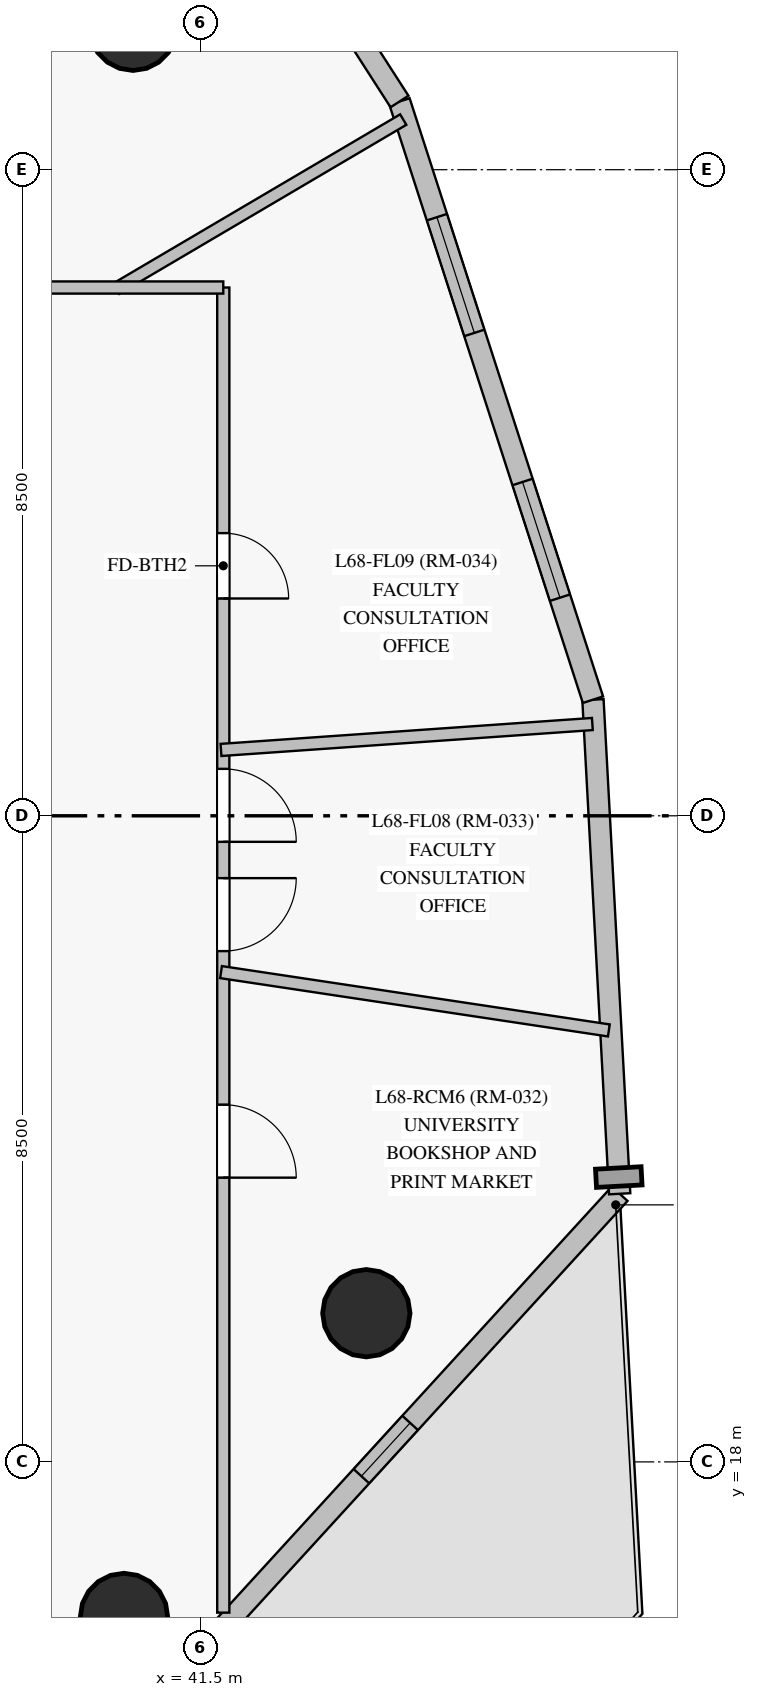
"""IFC4 building model, lengths in metres.
Left out: names, types, materials, properties, quantities, classifications, styles, units other than length and angle.
Written with IfcOpenShell. Run it as: python <this file> out.ifc"""

import sys

from ifc_helpers import new_model, si_unit, direction, frame, frame_2d, origin, origin_with_axes, origin_2d, place, context, subcontext, project, spatial, rectangle, circle, extrude, source, transform, mapped, element, fill, save


model = new_model("IFC4")
c1 = context("Model", 3, precision=1e-05, world=origin(), true_north=direction((0.0, 1.0)))
c2 = subcontext(c1, "Body", "Model", "MODEL_VIEW")
j1 = project(units=[si_unit("LENGTHUNIT", "METRE"), si_unit("PLANEANGLEUNIT", "RADIAN")], contexts=[c1])
p1 = place(None, origin())
s1 = spatial("IfcSite", under=j1, at=p1, CompositionType="ELEMENT")
p2 = place(p1, origin())
s2 = spatial("IfcBuilding", under=s1, at=p2, CompositionType="ELEMENT")
p3 = place(p2, frame((0.0, 0.0, 232.15)))
s3 = spatial("IfcBuildingStorey", under=s2, at=p3, CompositionType="ELEMENT", Elevation=232.15)
m1 = source(origin_with_axes(), c2, "Body", "SweptSolid", [
    extrude(circle(Radius=0.575, at=origin_2d()), origin(), (0.0, 0.0, 1.0), 3.05),
])
for number, where, z_axis, x_axis in (
    (1, (43.682, 19.956, 0.0), (0.0, 0.0, 1.0), (1.0, 0.0, 0.0)),
    (2, (40.613, 36.88, 0.0), (0.0, 0.0, 1.0), (1.0, 0.0, 0.0)),
    (3, (40.494, 15.96, 0.0), (0.0, 0.0, 1.0), (1.0, 0.0, 0.0)),
):
    element("IfcColumn", number, at=place(p3, frame(where, z_axis=z_axis, x_axis=x_axis)), inside=s3, PredefinedType="COLUMN", context=c2, shape_type="MappedRepresentation", body=[
        mapped(m1, transform((0.0, 0.0, 0.0), scale=1.0)),
    ])
p4 = place(p3, frame((34.218, 7.533, 0.0), z_axis=(0.0, 0.0, 1.0), x_axis=(0.674833312229, 0.737970189578, 0.0)))
e4 = element("IfcWall", 4, at=p4, inside=s3, PredefinedType="SOLIDWALL", context=c2, shape_type="SweptSolid", body=[
    extrude(rectangle(XDim=18.963, YDim=0.28, at=frame_2d((9.481, 0.0))), origin(), (0.0, 0.0, 1.0), 2.52),
])
p5 = place(p4, frame((5.091, 0.0, 0.85)))
e5 = element("IfcOpeningElement", 5, at=p5, cuts=e4, PredefinedType="OPENING", context=c2, shape_type="SweptSolid", body=[
    extrude(rectangle(XDim=0.95, YDim=1.5, at=frame_2d((0.475, 0.75))), frame((0.0, 0.15, 0.0), z_axis=(0.0, -1.0, 0.0), x_axis=(1.0, 0.0, 0.0)), (0.0, 0.0, 1.0), 0.3),
])
p6 = place(p4, frame((13.928, 0.0, 0.85)))
e6 = element("IfcOpeningElement", 6, at=p6, cuts=e4, PredefinedType="OPENING", context=c2, shape_type="SweptSolid", body=[
    extrude(rectangle(XDim=0.95, YDim=1.5, at=frame_2d((0.475, 0.75))), frame((0.0, 0.15, 0.0), z_axis=(0.0, -1.0, 0.0), x_axis=(1.0, 0.0, 0.0)), (0.0, 0.0, 1.0), 0.3),
])
p7 = place(p4, frame((3.426, 0.0, 0.0)))
e7 = element("IfcOpeningElement", 7, at=p7, cuts=e4, PredefinedType="OPENING", context=c2, shape_type="SweptSolid", body=[
    extrude(rectangle(XDim=1.05, YDim=2.12, at=frame_2d((0.525, 1.06))), frame((0.0, 0.15, 0.0), z_axis=(0.0, -1.0, 0.0), x_axis=(1.0, 0.0, 0.0)), (0.0, 0.0, 1.0), 0.3),
])
p8 = place(p3, frame((47.015, 21.527, 0.0), z_axis=(0.0, 0.0, 1.0), x_axis=(-0.054009623174, 0.998540415108, 0.0)))
e8 = element("IfcWall", 8, at=p8, inside=s3, PredefinedType="SOLIDWALL", context=c2, shape_type="SweptSolid", body=[
    extrude(rectangle(XDim=6.509, YDim=0.28, at=frame_2d((3.255, 0.0))), origin(), (0.0, 0.0, 1.0), 2.52),
])
p9 = place(p3, frame((46.664, 28.027, 0.0), z_axis=(0.0, 0.0, 1.0), x_axis=(-0.307705547062, 0.951481632144, 0.0)))
e9 = element("IfcWall", 9, at=p9, inside=s3, PredefinedType="SOLIDWALL", context=c2, shape_type="SweptSolid", body=[
    extrude(rectangle(XDim=8.271, YDim=0.28, at=frame_2d((4.136, 0.0))), origin(), (0.0, 0.0, 1.0), 2.85),
])
p10 = place(p9, frame((1.41, 0.0, 0.85)))
e10 = element("IfcOpeningElement", 10, at=p10, cuts=e9, PredefinedType="OPENING", context=c2, shape_type="SweptSolid", body=[
    extrude(rectangle(XDim=1.6, YDim=1.6, at=frame_2d((0.8, 0.8))), frame((0.0, 0.15, 0.0), z_axis=(0.0, -1.0, 0.0), x_axis=(1.0, 0.0, 0.0)), (0.0, 0.0, 1.0), 0.3),
])
p11 = place(p9, frame((5.072, 0.0, 0.85)))
e11 = element("IfcOpeningElement", 11, at=p11, cuts=e9, PredefinedType="OPENING", context=c2, shape_type="SweptSolid", body=[
    extrude(rectangle(XDim=1.6, YDim=1.6, at=frame_2d((0.8, 0.8))), frame((0.0, 0.15, 0.0), z_axis=(0.0, -1.0, 0.0), x_axis=(1.0, 0.0, 0.0)), (0.0, 0.0, 1.0), 0.3),
])
p12 = place(p3, frame((44.118, 35.897, 0.0), z_axis=(0.0, 0.0, 1.0), x_axis=(-0.540866189817, 0.841108652145, 0.0)))
e12 = element("IfcWall", 12, at=p12, inside=s3, PredefinedType="SOLIDWALL", context=c2, shape_type="SweptSolid", body=[
    extrude(rectangle(XDim=12.043, YDim=0.28, at=frame_2d((6.022, 0.0))), origin(), (0.0, 0.0, 1.0), 2.85),
])
p13 = place(p12, frame((1.461, 0.0, 0.85)))
e13 = element("IfcOpeningElement", 13, at=p13, cuts=e12, PredefinedType="OPENING", context=c2, shape_type="SweptSolid", body=[
    extrude(rectangle(XDim=1.6, YDim=1.6, at=frame_2d((0.8, 0.8))), frame((0.0, 0.15, 0.0), z_axis=(0.0, -1.0, 0.0), x_axis=(1.0, 0.0, 0.0)), (0.0, 0.0, 1.0), 0.3),
])
p14 = place(p12, frame((5.222, 0.0, 0.85)))
e14 = element("IfcOpeningElement", 14, at=p14, cuts=e12, PredefinedType="OPENING", context=c2, shape_type="SweptSolid", body=[
    extrude(rectangle(XDim=1.6, YDim=1.6, at=frame_2d((0.8, 0.8))), frame((0.0, 0.15, 0.0), z_axis=(0.0, -1.0, 0.0), x_axis=(1.0, 0.0, 0.0)), (0.0, 0.0, 1.0), 0.3),
])
p15 = place(p12, frame((8.983, 0.0, 0.85)))
e15 = element("IfcOpeningElement", 15, at=p15, cuts=e12, PredefinedType="OPENING", context=c2, shape_type="SweptSolid", body=[
    extrude(rectangle(XDim=1.6, YDim=1.6, at=frame_2d((0.8, 0.8))), frame((0.0, 0.15, 0.0), z_axis=(0.0, -1.0, 0.0), x_axis=(1.0, 0.0, 0.0)), (0.0, 0.0, 1.0), 0.3),
])
p16 = place(p3, frame((41.8, 33.45, 0.0), z_axis=(0.0, 0.0, 1.0), x_axis=(0.0, -1.0, 0.0)))
e16 = element("IfcWall", 16, at=p16, inside=s3, PredefinedType="PARTITIONING", context=c2, shape_type="SweptSolid", body=[
    extrude(rectangle(XDim=17.433, YDim=0.16, at=frame_2d((8.717, 0.0))), origin(), (0.0, 0.0, 1.0), 2.3),
])
p17 = place(p16, frame((10.75, 0.0, 0.0)))
e17 = element("IfcOpeningElement", 17, at=p17, cuts=e16, PredefinedType="OPENING", context=c2, shape_type="SweptSolid", body=[
    extrude(rectangle(XDim=0.96, YDim=2.15, at=frame_2d((0.48, 1.075))), frame((0.0, 0.09, 0.0), z_axis=(0.0, -1.0, 0.0), x_axis=(1.0, 0.0, 0.0)), (0.0, 0.0, 1.0), 0.18),
])
p18 = place(p16, frame((7.77, 0.0, 0.0)))
e18 = element("IfcOpeningElement", 18, at=p18, cuts=e16, PredefinedType="OPENING", context=c2, shape_type="SweptSolid", body=[
    extrude(rectangle(XDim=0.96, YDim=2.15, at=frame_2d((0.48, 1.075))), frame((0.0, 0.09, 0.0), z_axis=(0.0, -1.0, 0.0), x_axis=(1.0, 0.0, 0.0)), (0.0, 0.0, 1.0), 0.18),
])
p19 = place(p16, frame((6.333, 0.0, 0.0)))
e19 = element("IfcOpeningElement", 19, at=p19, cuts=e16, PredefinedType="OPENING", context=c2, shape_type="SweptSolid", body=[
    extrude(rectangle(XDim=0.96, YDim=2.15, at=frame_2d((0.48, 1.075))), frame((0.0, 0.09, 0.0), z_axis=(0.0, -1.0, 0.0), x_axis=(1.0, 0.0, 0.0)), (0.0, 0.0, 1.0), 0.18),
])
p20 = place(p16, frame((3.231, 0.0, 0.0)))
e20 = element("IfcOpeningElement", 20, at=p20, cuts=e16, PredefinedType="OPENING", context=c2, shape_type="SweptSolid", body=[
    extrude(rectangle(XDim=0.86, YDim=2.04, at=frame_2d((0.43, 1.02))), frame((0.0, 0.09, 0.0), z_axis=(0.0, -1.0, 0.0), x_axis=(1.0, 0.0, 0.0)), (0.0, 0.0, 1.0), 0.18),
])
p21 = place(p3, frame((41.77, 24.444, 0.0), z_axis=(0.0, 0.0, 1.0), x_axis=(0.988879708695, -0.148717590527, 0.0)))
e21 = element("IfcWall", 21, at=p21, inside=s3, PredefinedType="PARTITIONING", context=c2, shape_type="SweptSolid", body=[
    extrude(rectangle(XDim=5.16, YDim=0.16, at=frame_2d((2.58, 0.0))), origin(), (0.0, 0.0, 1.0), 2.85),
])
p22 = place(p3, frame((41.77, 27.366, 0.0), z_axis=(0.0, 0.0, 1.0), x_axis=(0.99757228295, 0.06963864078, 0.0)))
e22 = element("IfcWall", 22, at=p22, inside=s3, PredefinedType="PARTITIONING", context=c2, shape_type="SweptSolid", body=[
    extrude(rectangle(XDim=4.898, YDim=0.16, at=frame_2d((2.449, 0.0))), origin(), (0.0, 0.0, 1.0), 2.85),
])
p23 = place(p3, frame((40.391, 33.435, 0.0), z_axis=(0.0, 0.0, 1.0), x_axis=(0.861637645298, 0.507523958257, 0.0)))
e23 = element("IfcWall", 23, at=p23, inside=s3, PredefinedType="PARTITIONING", context=c2, shape_type="SweptSolid", body=[
    extrude(rectangle(XDim=4.383, YDim=0.16, at=frame_2d((2.191, 0.0))), origin(), (0.0, 0.0, 1.0), 2.85),
])
p24 = place(p3, frame((37.682, 33.45, 0.0), z_axis=(0.0, 0.0, 1.0), x_axis=(1.0, 0.0, 0.0)))
e24 = element("IfcWall", 24, at=p24, inside=s3, PredefinedType="PARTITIONING", context=c2, shape_type="SweptSolid", body=[
    extrude(rectangle(XDim=4.118, YDim=0.16, at=frame_2d((2.059, 0.0))), origin(), (0.0, 0.0, 1.0), 2.85),
])
m2 = source(origin_with_axes(), c2, "Body", "SweptSolid", [
    extrude(rectangle(XDim=0.95, YDim=1.5, at=frame_2d((0.475, 0.75))), frame((0.0, 0.03, 0.0), z_axis=(0.0, -1.0, 0.0), x_axis=(1.0, 0.0, 0.0)), (0.0, 0.0, 1.0), 0.06),
])
p25 = place(p6, origin())
e25 = element("IfcWindow", 25, at=p25, inside=s3, PartitioningType="SINGLE_PANEL", PredefinedType="WINDOW", context=c2, shape_type="MappedRepresentation", body=[
    mapped(m2, transform((0.0, 0.0, 0.0), scale=1.0)),
])
fill(e6, e25)
m3 = source(origin_with_axes(), c2, "Body", "SweptSolid", [
    extrude(rectangle(XDim=1.6, YDim=1.6, at=frame_2d((0.8, 0.8))), frame((0.0, 0.03, 0.0), z_axis=(0.0, -1.0, 0.0), x_axis=(1.0, 0.0, 0.0)), (0.0, 0.0, 1.0), 0.06),
])
p26 = place(p10, origin())
e26 = element("IfcWindow", 26, at=p26, inside=s3, PartitioningType="SINGLE_PANEL", PredefinedType="WINDOW", context=c2, shape_type="MappedRepresentation", body=[
    mapped(m3, transform((0.0, 0.0, 0.0), scale=1.0)),
])
fill(e10, e26)
p27 = place(p11, origin())
e27 = element("IfcWindow", 27, at=p27, inside=s3, PartitioningType="SINGLE_PANEL", PredefinedType="WINDOW", context=c2, shape_type="MappedRepresentation", body=[
    mapped(m3, transform((0.0, 0.0, 0.0), scale=1.0)),
])
fill(e11, e27)
m4 = source(origin_with_axes(), c2, "Body", "SweptSolid", [
    extrude(rectangle(XDim=0.96, YDim=2.15, at=frame_2d((0.48, 1.075))), frame((0.0, 0.025, 0.0), z_axis=(0.0, -1.0, 0.0), x_axis=(1.0, 0.0, 0.0)), (0.0, 0.0, 1.0), 0.05),
])
p28 = place(p17, origin())
e28 = element("IfcDoor", 28, at=p28, inside=s3, OperationType="SINGLE_SWING_RIGHT", PredefinedType="DOOR", context=c2, shape_type="MappedRepresentation", body=[
    mapped(m4, transform((0.0, 0.0, 0.0), scale=1.0)),
])
fill(e17, e28)
p29 = place(p18, origin())
e29 = element("IfcDoor", 29, at=p29, inside=s3, OperationType="SINGLE_SWING_LEFT", PredefinedType="DOOR", context=c2, shape_type="MappedRepresentation", body=[
    mapped(m4, transform((0.0, 0.0, 0.0), scale=1.0)),
])
fill(e18, e29)
p30 = place(p19, origin())
e30 = element("IfcDoor", 30, at=p30, inside=s3, OperationType="SINGLE_SWING_RIGHT", PredefinedType="DOOR", context=c2, shape_type="MappedRepresentation", body=[
    mapped(m4, transform((0.0, 0.0, 0.0), scale=1.0)),
])
fill(e19, e30)
m5 = source(origin_with_axes(), c2, "Body", "SweptSolid", [
    extrude(rectangle(XDim=0.86, YDim=2.04, at=frame_2d((0.43, 1.02))), frame((0.0, 0.025, 0.0), z_axis=(0.0, -1.0, 0.0), x_axis=(1.0, 0.0, 0.0)), (0.0, 0.0, 1.0), 0.05),
])
p31 = place(p20, origin())
e31 = element("IfcDoor", 31, at=p31, inside=s3, OperationType="SINGLE_SWING_RIGHT", PredefinedType="DOOR", context=c2, shape_type="MappedRepresentation", body=[
    mapped(m5, transform((0.0, 0.0, 0.0), scale=1.0)),
])
fill(e20, e31)
save(model, sys.argv[1])
